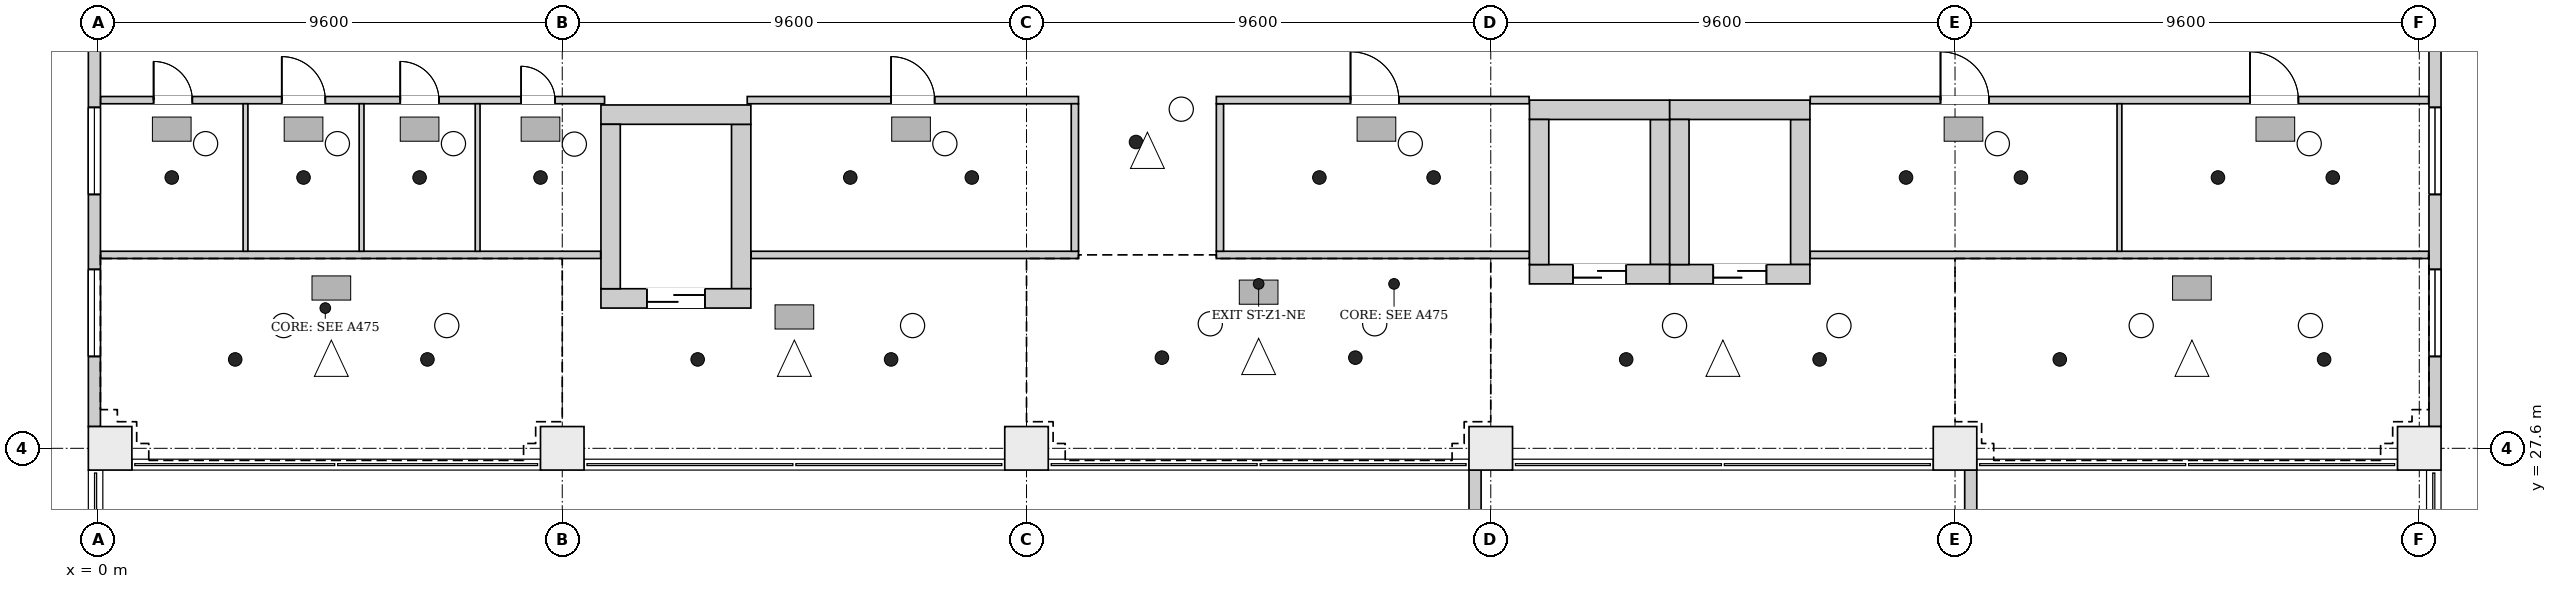
"""IFC4 building model, lengths in metres.
Left out: names, types, materials, properties, quantities, classifications, styles, units other than length and angle.
Written with IfcOpenShell. Run it as: python <this file> out.ifc"""

import sys

from ifc_helpers import new_model, si_unit, direction, frame, frame_2d, origin, origin_2d, place, context, subcontext, project, spatial, rectangle, extrude, element, fill, save


model = new_model("IFC4")
c1 = context("Model", 3, precision=1e-05, world=origin(), true_north=direction((0.0, 1.0)))
c2 = subcontext(c1, "Body", "Model", "MODEL_VIEW")
j1 = project(units=[si_unit("LENGTHUNIT", "METRE"), si_unit("PLANEANGLEUNIT", "RADIAN")], contexts=[c1])
p1 = place(None, origin())
s1 = spatial("IfcSite", under=j1, at=p1, CompositionType="ELEMENT")
p2 = place(p1, origin())
s2 = spatial("IfcBuilding", under=s1, at=p2, CompositionType="ELEMENT")
p3 = place(p2, frame((0.0, 0.0, 48.7)))
s3 = spatial("IfcBuildingStorey", under=s2, at=p3, CompositionType="ELEMENT", Elevation=48.7)
p4 = place(p3, frame((10.4, 30.7, 0.0), z_axis=(0.0, 0.0, 1.0), x_axis=(1.0, 0.0, 0.0)))
e1 = element("IfcWall", 1, at=p4, inside=s3, PredefinedType="SHEAR", context=c2, shape_type="SweptSolid", body=[
    extrude(rectangle(XDim=3.1, YDim=0.4, at=frame_2d((1.55, 0.0))), origin(), (0.0, 0.0, 1.0), 4.2),
])
p5 = place(p4, frame((0.95, 0.0, 0.0)))
e2 = element("IfcOpeningElement", 2, at=p5, cuts=e1, PredefinedType="OPENING", context=c2, shape_type="SweptSolid", body=[
    extrude(rectangle(XDim=1.2, YDim=2.1, at=frame_2d((0.6, 1.05))), frame((0.0, 0.21, 0.0), z_axis=(0.0, -1.0, 0.0), x_axis=(1.0, 0.0, 0.0)), (0.0, 0.0, 1.0), 0.42),
])
p6 = place(p3, frame((10.4, 34.5, 0.0), z_axis=(0.0, 0.0, 1.0), x_axis=(1.0, 0.0, 0.0)))
e3 = element("IfcWall", 3, at=p6, inside=s3, PredefinedType="SHEAR", context=c2, shape_type="SweptSolid", body=[
    extrude(rectangle(XDim=3.1, YDim=0.4, at=frame_2d((1.55, 0.0))), origin(), (0.0, 0.0, 1.0), 4.2),
])
for number, where, z_axis, x_axis in (
    (4, (10.6, 30.9, 0.0), (0.0, 0.0, 1.0), (0.0, 1.0, 0.0)),
    (5, (13.3, 30.9, 0.0), (0.0, 0.0, 1.0), (0.0, 1.0, 0.0)),
):
    element("IfcWall", number, at=place(p3, frame(where, z_axis=z_axis, x_axis=x_axis)), inside=s3, PredefinedType="SHEAR", context=c2, shape_type="SweptSolid", body=[
        extrude(rectangle(XDim=3.4, YDim=0.4, at=frame_2d((1.7, 0.0))), origin(), (0.0, 0.0, 1.0), 4.2),
    ])
p7 = place(p3, frame((29.6, 31.2, 0.0), z_axis=(0.0, 0.0, 1.0), x_axis=(1.0, 0.0, 0.0)))
e6 = element("IfcWall", 6, at=p7, inside=s3, PredefinedType="SHEAR", context=c2, shape_type="SweptSolid", body=[
    extrude(rectangle(XDim=2.9, YDim=0.4, at=frame_2d((1.45, 0.0))), origin(), (0.0, 0.0, 1.0), 4.2),
])
p8 = place(p7, frame((0.9, 0.0, 0.0)))
e7 = element("IfcOpeningElement", 7, at=p8, cuts=e6, PredefinedType="OPENING", context=c2, shape_type="SweptSolid", body=[
    extrude(rectangle(XDim=1.1, YDim=2.1, at=frame_2d((0.55, 1.05))), frame((0.0, 0.21, 0.0), z_axis=(0.0, -1.0, 0.0), x_axis=(1.0, 0.0, 0.0)), (0.0, 0.0, 1.0), 0.42),
])
p9 = place(p3, frame((29.6, 34.6, 0.0), z_axis=(0.0, 0.0, 1.0), x_axis=(1.0, 0.0, 0.0)))
e8 = element("IfcWall", 8, at=p9, inside=s3, PredefinedType="SHEAR", context=c2, shape_type="SweptSolid", body=[
    extrude(rectangle(XDim=2.9, YDim=0.4, at=frame_2d((1.45, 0.0))), origin(), (0.0, 0.0, 1.0), 4.2),
])
for number, where, z_axis, x_axis in (
    (9, (29.8, 31.4, 0.0), (0.0, 0.0, 1.0), (0.0, 1.0, 0.0)),
    (10, (32.3, 31.4, 0.0), (0.0, 0.0, 1.0), (0.0, 1.0, 0.0)),
):
    element("IfcWall", number, at=place(p3, frame(where, z_axis=z_axis, x_axis=x_axis)), inside=s3, PredefinedType="SHEAR", context=c2, shape_type="SweptSolid", body=[
        extrude(rectangle(XDim=3.0, YDim=0.4, at=frame_2d((1.5, 0.0))), origin(), (0.0, 0.0, 1.0), 4.2),
    ])
p10 = place(p3, frame((32.5, 31.2, 0.0), z_axis=(0.0, 0.0, 1.0), x_axis=(1.0, 0.0, 0.0)))
e11 = element("IfcWall", 11, at=p10, inside=s3, PredefinedType="SHEAR", context=c2, shape_type="SweptSolid", body=[
    extrude(rectangle(XDim=2.9, YDim=0.4, at=frame_2d((1.45, 0.0))), origin(), (0.0, 0.0, 1.0), 4.2),
])
p11 = place(p10, frame((0.9, 0.0, 0.0)))
e12 = element("IfcOpeningElement", 12, at=p11, cuts=e11, PredefinedType="OPENING", context=c2, shape_type="SweptSolid", body=[
    extrude(rectangle(XDim=1.1, YDim=2.1, at=frame_2d((0.55, 1.05))), frame((0.0, 0.21, 0.0), z_axis=(0.0, -1.0, 0.0), x_axis=(1.0, 0.0, 0.0)), (0.0, 0.0, 1.0), 0.42),
])
p12 = place(p3, frame((32.5, 34.6, 0.0), z_axis=(0.0, 0.0, 1.0), x_axis=(1.0, 0.0, 0.0)))
e13 = element("IfcWall", 13, at=p12, inside=s3, PredefinedType="SHEAR", context=c2, shape_type="SweptSolid", body=[
    extrude(rectangle(XDim=2.9, YDim=0.4, at=frame_2d((1.45, 0.0))), origin(), (0.0, 0.0, 1.0), 4.2),
])
for number, where, z_axis, x_axis in (
    (14, (32.7, 31.4, 0.0), (0.0, 0.0, 1.0), (0.0, 1.0, 0.0)),
    (15, (35.2, 31.4, 0.0), (0.0, 0.0, 1.0), (0.0, 1.0, 0.0)),
):
    element("IfcWall", number, at=place(p3, frame(where, z_axis=z_axis, x_axis=x_axis)), inside=s3, PredefinedType="SHEAR", context=c2, shape_type="SweptSolid", body=[
        extrude(rectangle(XDim=3.0, YDim=0.4, at=frame_2d((1.5, 0.0))), origin(), (0.0, 0.0, 1.0), 4.2),
    ])
for number, where, z_axis, x_axis in (
    (16, (0.25, 27.6, 0.0), (0.0, 0.0, 1.0), (1.0, 0.0, 0.0)),
    (17, (9.6, 27.6, 0.0), (0.0, 0.0, 1.0), (1.0, 0.0, 0.0)),
    (18, (19.2, 27.6, 0.0), (0.0, 0.0, 1.0), (1.0, 0.0, 0.0)),
    (19, (28.8, 27.6, 0.0), (0.0, 0.0, 1.0), (1.0, 0.0, 0.0)),
    (20, (38.4, 27.6, 0.0), (0.0, 0.0, 1.0), (1.0, 0.0, 0.0)),
    (21, (48.0, 27.6, 0.0), (0.0, 0.0, 1.0), (1.0, 0.0, 0.0)),
):
    element("IfcColumn", number, at=place(p3, frame(where, z_axis=z_axis, x_axis=x_axis)), inside=s3, PredefinedType="COLUMN", context=c2, shape_type="SweptSolid", body=[
        extrude(rectangle(XDim=0.9, YDim=0.9, at=origin_2d()), origin(), (0.0, 0.0, 1.0), 4.2),
    ])
p13 = place(p3, frame((-0.074, 36.35, 0.0), z_axis=(0.0, 0.0, 1.0), x_axis=(0.0, -1.0, 0.0)))
e22 = element("IfcWall", 22, at=p13, inside=s3, PredefinedType="ELEMENTEDWALL", context=c2, shape_type="SweptSolid", body=[
    extrude(rectangle(XDim=8.3, YDim=0.25, at=frame_2d((4.15, 0.0))), origin(), (0.0, 0.0, 1.0), 3.9),
])
p14 = place(p13, frame((5.05, 0.0, 0.9)))
e23 = element("IfcOpeningElement", 23, at=p14, cuts=e22, PredefinedType="OPENING", context=c2, shape_type="SweptSolid", body=[
    extrude(rectangle(XDim=1.8, YDim=2.6, at=frame_2d((0.9, 1.3))), frame((0.0, 0.135, 0.0), z_axis=(0.0, -1.0, 0.0), x_axis=(1.0, 0.0, 0.0)), (0.0, 0.0, 1.0), 0.27),
])
p15 = place(p13, frame((1.7, 0.0, 0.9)))
e24 = element("IfcOpeningElement", 24, at=p15, cuts=e22, PredefinedType="OPENING", context=c2, shape_type="SweptSolid", body=[
    extrude(rectangle(XDim=1.8, YDim=2.6, at=frame_2d((0.9, 1.3))), frame((0.0, 0.135, 0.0), z_axis=(0.0, -1.0, 0.0), x_axis=(1.0, 0.0, 0.0)), (0.0, 0.0, 1.0), 0.27),
])
p16 = place(p3, frame((48.325, 28.05, 0.0), z_axis=(0.0, 0.0, 1.0), x_axis=(0.0, 1.0, 0.0)))
e25 = element("IfcWall", 25, at=p16, inside=s3, PredefinedType="ELEMENTEDWALL", context=c2, shape_type="SweptSolid", body=[
    extrude(rectangle(XDim=8.3, YDim=0.25, at=frame_2d((4.15, 0.0))), origin(), (0.0, 0.0, 1.0), 3.9),
])
p17 = place(p16, frame((1.45, 0.0, 0.9)))
e26 = element("IfcOpeningElement", 26, at=p17, cuts=e25, PredefinedType="OPENING", context=c2, shape_type="SweptSolid", body=[
    extrude(rectangle(XDim=1.8, YDim=2.6, at=frame_2d((0.9, 1.3))), frame((0.0, 0.135, 0.0), z_axis=(0.0, -1.0, 0.0), x_axis=(1.0, 0.0, 0.0)), (0.0, 0.0, 1.0), 0.27),
])
p18 = place(p16, frame((4.8, 0.0, 0.9)))
e27 = element("IfcOpeningElement", 27, at=p18, cuts=e25, PredefinedType="OPENING", context=c2, shape_type="SweptSolid", body=[
    extrude(rectangle(XDim=1.8, YDim=2.6, at=frame_2d((0.9, 1.3))), frame((0.0, 0.135, 0.0), z_axis=(0.0, -1.0, 0.0), x_axis=(1.0, 0.0, 0.0)), (0.0, 0.0, 1.0), 0.27),
])
for number, where, z_axis, x_axis in (
    (28, (38.725, 18.85, 4.2), (0.0, 0.0, 1.0), (0.0, 1.0, 0.0)),
    (29, (28.475, 27.15, 4.2), (0.0, 0.0, 1.0), (0.0, -1.0, 0.0)),
):
    element("IfcWall", number, at=place(p3, frame(where, z_axis=z_axis, x_axis=x_axis)), inside=s3, PredefinedType="PARAPET", context=c2, shape_type="SweptSolid", body=[
        extrude(rectangle(XDim=8.3, YDim=0.25, at=frame_2d((4.15, 0.0))), origin(), (0.0, 0.0, 1.0), 1.1),
    ])
p19 = place(p3, frame((0.056, 31.6, 0.0), z_axis=(0.0, 0.0, 1.0), x_axis=(1.0, 0.0, 0.0)))
e30 = element("IfcWall", 30, at=p19, inside=s3, PredefinedType="PARTITIONING", context=c2, shape_type="SweptSolid", body=[
    extrude(rectangle(XDim=10.338, YDim=0.15, at=frame_2d((5.169, 0.0))), origin(), (0.0, 0.0, 1.0), 3.9),
])
p20 = place(p3, frame((0.056, 34.8, 0.0), z_axis=(0.0, 0.0, 1.0), x_axis=(1.0, 0.0, 0.0)))
e31 = element("IfcWall", 31, at=p20, inside=s3, PredefinedType="PARTITIONING", context=c2, shape_type="SweptSolid", body=[
    extrude(rectangle(XDim=10.419, YDim=0.15, at=frame_2d((5.209, 0.0))), origin(), (0.0, 0.0, 1.0), 3.9),
])
p21 = place(p20, frame((1.094, 0.0, 0.0)))
e32 = element("IfcOpeningElement", 32, at=p21, cuts=e31, PredefinedType="OPENING", context=c2, shape_type="SweptSolid", body=[
    extrude(rectangle(XDim=0.8, YDim=2.1, at=frame_2d((0.4, 1.05))), frame((0.0, 0.085, 0.0), z_axis=(0.0, -1.0, 0.0), x_axis=(1.0, 0.0, 0.0)), (0.0, 0.0, 1.0), 0.17),
])
p22 = place(p20, frame((3.744, 0.0, 0.0)))
e33 = element("IfcOpeningElement", 33, at=p22, cuts=e31, PredefinedType="OPENING", context=c2, shape_type="SweptSolid", body=[
    extrude(rectangle(XDim=0.9, YDim=2.1, at=frame_2d((0.45, 1.05))), frame((0.0, 0.085, 0.0), z_axis=(0.0, -1.0, 0.0), x_axis=(1.0, 0.0, 0.0)), (0.0, 0.0, 1.0), 0.17),
])
p23 = place(p20, frame((6.194, 0.0, 0.0)))
e34 = element("IfcOpeningElement", 34, at=p23, cuts=e31, PredefinedType="OPENING", context=c2, shape_type="SweptSolid", body=[
    extrude(rectangle(XDim=0.8, YDim=2.1, at=frame_2d((0.4, 1.05))), frame((0.0, 0.085, 0.0), z_axis=(0.0, -1.0, 0.0), x_axis=(1.0, 0.0, 0.0)), (0.0, 0.0, 1.0), 0.17),
])
p24 = place(p20, frame((8.694, 0.0, 0.0)))
e35 = element("IfcOpeningElement", 35, at=p24, cuts=e31, PredefinedType="OPENING", context=c2, shape_type="SweptSolid", body=[
    extrude(rectangle(XDim=0.7, YDim=2.1, at=frame_2d((0.35, 1.05))), frame((0.0, 0.085, 0.0), z_axis=(0.0, -1.0, 0.0), x_axis=(1.0, 0.0, 0.0)), (0.0, 0.0, 1.0), 0.17),
])
for number, where, z_axis, x_axis in (
    (36, (3.05, 31.675, 0.0), (0.0, 0.0, 1.0), (0.0, 1.0, 0.0)),
    (37, (5.45, 31.675, 0.0), (0.0, 0.0, 1.0), (0.0, 1.0, 0.0)),
    (38, (7.85, 31.675, 0.0), (0.0, 0.0, 1.0), (0.0, 1.0, 0.0)),
):
    element("IfcWall", number, at=place(p3, frame(where, z_axis=z_axis, x_axis=x_axis)), inside=s3, PredefinedType="PARTITIONING", context=c2, shape_type="SweptSolid", body=[
        extrude(rectangle(XDim=3.05, YDim=0.1, at=frame_2d((1.525, 0.0))), origin(), (0.0, 0.0, 1.0), 3.9),
    ])
p25 = place(p3, frame((13.425, 34.8, 0.0), z_axis=(0.0, 0.0, 1.0), x_axis=(1.0, 0.0, 0.0)))
e39 = element("IfcWall", 39, at=p25, inside=s3, PredefinedType="PARTITIONING", context=c2, shape_type="SweptSolid", body=[
    extrude(rectangle(XDim=6.85, YDim=0.15, at=frame_2d((3.425, 0.0))), origin(), (0.0, 0.0, 1.0), 3.9),
])
p26 = place(p25, frame((2.975, 0.0, 0.0)))
e40 = element("IfcOpeningElement", 40, at=p26, cuts=e39, PredefinedType="OPENING", context=c2, shape_type="SweptSolid", body=[
    extrude(rectangle(XDim=0.9, YDim=2.1, at=frame_2d((0.45, 1.05))), frame((0.0, 0.085, 0.0), z_axis=(0.0, -1.0, 0.0), x_axis=(1.0, 0.0, 0.0)), (0.0, 0.0, 1.0), 0.17),
])
p27 = place(p3, frame((13.506, 31.6, 0.0), z_axis=(0.0, 0.0, 1.0), x_axis=(1.0, 0.0, 0.0)))
e41 = element("IfcWall", 41, at=p27, inside=s3, PredefinedType="PARTITIONING", context=c2, shape_type="SweptSolid", body=[
    extrude(rectangle(XDim=6.769, YDim=0.15, at=frame_2d((3.384, 0.0))), origin(), (0.0, 0.0, 1.0), 3.9),
])
p28 = place(p3, frame((20.2, 31.675, 0.0), z_axis=(0.0, 0.0, 1.0), x_axis=(0.0, 1.0, 0.0)))
e42 = element("IfcWall", 42, at=p28, inside=s3, PredefinedType="PARTITIONING", context=c2, shape_type="SweptSolid", body=[
    extrude(rectangle(XDim=3.05, YDim=0.15, at=frame_2d((1.525, 0.0))), origin(), (0.0, 0.0, 1.0), 3.9),
])
p29 = place(p3, frame((23.125, 31.6, 0.0), z_axis=(0.0, 0.0, 1.0), x_axis=(1.0, 0.0, 0.0)))
e43 = element("IfcWall", 43, at=p29, inside=s3, PredefinedType="PARTITIONING", context=c2, shape_type="SweptSolid", body=[
    extrude(rectangle(XDim=6.469, YDim=0.15, at=frame_2d((3.234, 0.0))), origin(), (0.0, 0.0, 1.0), 3.9),
])
p30 = place(p3, frame((23.2, 31.675, 0.0), z_axis=(0.0, 0.0, 1.0), x_axis=(0.0, 1.0, 0.0)))
e44 = element("IfcWall", 44, at=p30, inside=s3, PredefinedType="PARTITIONING", context=c2, shape_type="SweptSolid", body=[
    extrude(rectangle(XDim=3.05, YDim=0.15, at=frame_2d((1.525, 0.0))), origin(), (0.0, 0.0, 1.0), 3.9),
])
p31 = place(p3, frame((23.125, 34.8, 0.0), z_axis=(0.0, 0.0, 1.0), x_axis=(1.0, 0.0, 0.0)))
e45 = element("IfcWall", 45, at=p31, inside=s3, PredefinedType="PARTITIONING", context=c2, shape_type="SweptSolid", body=[
    extrude(rectangle(XDim=6.469, YDim=0.15, at=frame_2d((3.234, 0.0))), origin(), (0.0, 0.0, 1.0), 3.9),
])
p32 = place(p31, frame((2.775, 0.0, 0.0)))
e46 = element("IfcOpeningElement", 46, at=p32, cuts=e45, PredefinedType="OPENING", context=c2, shape_type="SweptSolid", body=[
    extrude(rectangle(XDim=1.0, YDim=2.1, at=frame_2d((0.5, 1.05))), frame((0.0, 0.085, 0.0), z_axis=(0.0, -1.0, 0.0), x_axis=(1.0, 0.0, 0.0)), (0.0, 0.0, 1.0), 0.17),
])
p33 = place(p3, frame((35.406, 31.6, 0.0), z_axis=(0.0, 0.0, 1.0), x_axis=(1.0, 0.0, 0.0)))
e47 = element("IfcWall", 47, at=p33, inside=s3, PredefinedType="PARTITIONING", context=c2, shape_type="SweptSolid", body=[
    extrude(rectangle(XDim=12.788, YDim=0.15, at=frame_2d((6.394, 0.0))), origin(), (0.0, 0.0, 1.0), 3.9),
])
p34 = place(p3, frame((35.406, 34.8, 0.0), z_axis=(0.0, 0.0, 1.0), x_axis=(1.0, 0.0, 0.0)))
e48 = element("IfcWall", 48, at=p34, inside=s3, PredefinedType="PARTITIONING", context=c2, shape_type="SweptSolid", body=[
    extrude(rectangle(XDim=12.788, YDim=0.15, at=frame_2d((6.394, 0.0))), origin(), (0.0, 0.0, 1.0), 3.9),
])
p35 = place(p34, frame((2.694, 0.0, 0.0)))
e49 = element("IfcOpeningElement", 49, at=p35, cuts=e48, PredefinedType="OPENING", context=c2, shape_type="SweptSolid", body=[
    extrude(rectangle(XDim=1.0, YDim=2.1, at=frame_2d((0.5, 1.05))), frame((0.0, 0.085, 0.0), z_axis=(0.0, -1.0, 0.0), x_axis=(1.0, 0.0, 0.0)), (0.0, 0.0, 1.0), 0.17),
])
p36 = place(p34, frame((9.094, 0.0, 0.0)))
e50 = element("IfcOpeningElement", 50, at=p36, cuts=e48, PredefinedType="OPENING", context=c2, shape_type="SweptSolid", body=[
    extrude(rectangle(XDim=1.0, YDim=2.1, at=frame_2d((0.5, 1.05))), frame((0.0, 0.085, 0.0), z_axis=(0.0, -1.0, 0.0), x_axis=(1.0, 0.0, 0.0)), (0.0, 0.0, 1.0), 0.17),
])
p37 = place(p3, frame((41.8, 31.675, 0.0), z_axis=(0.0, 0.0, 1.0), x_axis=(0.0, 1.0, 0.0)))
e51 = element("IfcWall", 51, at=p37, inside=s3, PredefinedType="PARTITIONING", context=c2, shape_type="SweptSolid", body=[
    extrude(rectangle(XDim=3.05, YDim=0.1, at=frame_2d((1.525, 0.0))), origin(), (0.0, 0.0, 1.0), 3.9),
])
p38 = place(p14, origin())
e52 = element("IfcWindow", 52, at=p38, inside=s3, PartitioningType="SINGLE_PANEL", PredefinedType="WINDOW", context=c2, shape_type="SweptSolid", body=[
    extrude(rectangle(XDim=1.8, YDim=2.6, at=frame_2d((0.9, 1.3))), frame((0.0, 0.03, 0.0), z_axis=(0.0, -1.0, 0.0), x_axis=(1.0, 0.0, 0.0)), (0.0, 0.0, 1.0), 0.06),
])
fill(e23, e52)
p39 = place(p15, origin())
e53 = element("IfcWindow", 53, at=p39, inside=s3, PartitioningType="SINGLE_PANEL", PredefinedType="WINDOW", context=c2, shape_type="SweptSolid", body=[
    extrude(rectangle(XDim=1.8, YDim=2.6, at=frame_2d((0.9, 1.3))), frame((0.0, 0.03, 0.0), z_axis=(0.0, -1.0, 0.0), x_axis=(1.0, 0.0, 0.0)), (0.0, 0.0, 1.0), 0.06),
])
fill(e24, e53)
p40 = place(p17, origin())
e54 = element("IfcWindow", 54, at=p40, inside=s3, PartitioningType="SINGLE_PANEL", PredefinedType="WINDOW", context=c2, shape_type="SweptSolid", body=[
    extrude(rectangle(XDim=1.8, YDim=2.6, at=frame_2d((0.9, 1.3))), frame((0.0, 0.03, 0.0), z_axis=(0.0, -1.0, 0.0), x_axis=(1.0, 0.0, 0.0)), (0.0, 0.0, 1.0), 0.06),
])
fill(e26, e54)
p41 = place(p18, origin())
e55 = element("IfcWindow", 55, at=p41, inside=s3, PartitioningType="SINGLE_PANEL", PredefinedType="WINDOW", context=c2, shape_type="SweptSolid", body=[
    extrude(rectangle(XDim=1.8, YDim=2.6, at=frame_2d((0.9, 1.3))), frame((0.0, 0.03, 0.0), z_axis=(0.0, -1.0, 0.0), x_axis=(1.0, 0.0, 0.0)), (0.0, 0.0, 1.0), 0.06),
])
fill(e27, e55)
p42 = place(p5, origin())
e56 = element("IfcDoor", 56, at=p42, inside=s3, OperationType="DOUBLE_DOOR_SLIDING", PredefinedType="DOOR", context=c2, shape_type="SweptSolid", body=[
    extrude(rectangle(XDim=1.2, YDim=2.1, at=frame_2d((0.6, 1.05))), frame((0.0, 0.025, 0.0), z_axis=(0.0, -1.0, 0.0), x_axis=(1.0, 0.0, 0.0)), (0.0, 0.0, 1.0), 0.05),
])
fill(e2, e56)
p43 = place(p8, origin())
e57 = element("IfcDoor", 57, at=p43, inside=s3, OperationType="DOUBLE_DOOR_SLIDING", PredefinedType="DOOR", context=c2, shape_type="SweptSolid", body=[
    extrude(rectangle(XDim=1.1, YDim=2.1, at=frame_2d((0.55, 1.05))), frame((0.0, 0.025, 0.0), z_axis=(0.0, -1.0, 0.0), x_axis=(1.0, 0.0, 0.0)), (0.0, 0.0, 1.0), 0.05),
])
fill(e7, e57)
p44 = place(p11, origin())
e58 = element("IfcDoor", 58, at=p44, inside=s3, OperationType="DOUBLE_DOOR_SLIDING", PredefinedType="DOOR", context=c2, shape_type="SweptSolid", body=[
    extrude(rectangle(XDim=1.1, YDim=2.1, at=frame_2d((0.55, 1.05))), frame((0.0, 0.025, 0.0), z_axis=(0.0, -1.0, 0.0), x_axis=(1.0, 0.0, 0.0)), (0.0, 0.0, 1.0), 0.05),
])
fill(e12, e58)
p45 = place(p21, origin())
e59 = element("IfcDoor", 59, at=p45, inside=s3, OperationType="SINGLE_SWING_RIGHT", PredefinedType="DOOR", context=c2, shape_type="SweptSolid", body=[
    extrude(rectangle(XDim=0.8, YDim=2.1, at=frame_2d((0.4, 1.05))), frame((0.0, 0.025, 0.0), z_axis=(0.0, -1.0, 0.0), x_axis=(1.0, 0.0, 0.0)), (0.0, 0.0, 1.0), 0.05),
])
fill(e32, e59)
p46 = place(p22, origin())
e60 = element("IfcDoor", 60, at=p46, inside=s3, OperationType="SINGLE_SWING_LEFT", PredefinedType="DOOR", context=c2, shape_type="SweptSolid", body=[
    extrude(rectangle(XDim=0.9, YDim=2.1, at=frame_2d((0.45, 1.05))), frame((0.0, 0.025, 0.0), z_axis=(0.0, -1.0, 0.0), x_axis=(1.0, 0.0, 0.0)), (0.0, 0.0, 1.0), 0.05),
])
fill(e33, e60)
p47 = place(p23, origin())
e61 = element("IfcDoor", 61, at=p47, inside=s3, OperationType="SINGLE_SWING_RIGHT", PredefinedType="DOOR", context=c2, shape_type="SweptSolid", body=[
    extrude(rectangle(XDim=0.8, YDim=2.1, at=frame_2d((0.4, 1.05))), frame((0.0, 0.025, 0.0), z_axis=(0.0, -1.0, 0.0), x_axis=(1.0, 0.0, 0.0)), (0.0, 0.0, 1.0), 0.05),
])
fill(e34, e61)
p48 = place(p24, origin())
e62 = element("IfcDoor", 62, at=p48, inside=s3, OperationType="SINGLE_SWING_LEFT", PredefinedType="DOOR", context=c2, shape_type="SweptSolid", body=[
    extrude(rectangle(XDim=0.7, YDim=2.1, at=frame_2d((0.35, 1.05))), frame((0.0, 0.025, 0.0), z_axis=(0.0, -1.0, 0.0), x_axis=(1.0, 0.0, 0.0)), (0.0, 0.0, 1.0), 0.05),
])
fill(e35, e62)
p49 = place(p26, origin())
e63 = element("IfcDoor", 63, at=p49, inside=s3, OperationType="SINGLE_SWING_RIGHT", PredefinedType="DOOR", context=c2, shape_type="SweptSolid", body=[
    extrude(rectangle(XDim=0.9, YDim=2.1, at=frame_2d((0.45, 1.05))), frame((0.0, 0.025, 0.0), z_axis=(0.0, -1.0, 0.0), x_axis=(1.0, 0.0, 0.0)), (0.0, 0.0, 1.0), 0.05),
])
fill(e40, e63)
p50 = place(p32, origin())
e64 = element("IfcDoor", 64, at=p50, inside=s3, OperationType="SINGLE_SWING_LEFT", PredefinedType="DOOR", context=c2, shape_type="SweptSolid", body=[
    extrude(rectangle(XDim=1.0, YDim=2.1, at=frame_2d((0.5, 1.05))), frame((0.0, 0.025, 0.0), z_axis=(0.0, -1.0, 0.0), x_axis=(1.0, 0.0, 0.0)), (0.0, 0.0, 1.0), 0.05),
])
fill(e46, e64)
p51 = place(p35, origin())
e65 = element("IfcDoor", 65, at=p51, inside=s3, OperationType="SINGLE_SWING_RIGHT", PredefinedType="DOOR", context=c2, shape_type="SweptSolid", body=[
    extrude(rectangle(XDim=1.0, YDim=2.1, at=frame_2d((0.5, 1.05))), frame((0.0, 0.025, 0.0), z_axis=(0.0, -1.0, 0.0), x_axis=(1.0, 0.0, 0.0)), (0.0, 0.0, 1.0), 0.05),
])
fill(e49, e65)
p52 = place(p36, origin())
e66 = element("IfcDoor", 66, at=p52, inside=s3, OperationType="SINGLE_SWING_LEFT", PredefinedType="DOOR", context=c2, shape_type="SweptSolid", body=[
    extrude(rectangle(XDim=1.0, YDim=2.1, at=frame_2d((0.5, 1.05))), frame((0.0, 0.025, 0.0), z_axis=(0.0, -1.0, 0.0), x_axis=(1.0, 0.0, 0.0)), (0.0, 0.0, 1.0), 0.05),
])
fill(e50, e66)
save(model, sys.argv[1])
